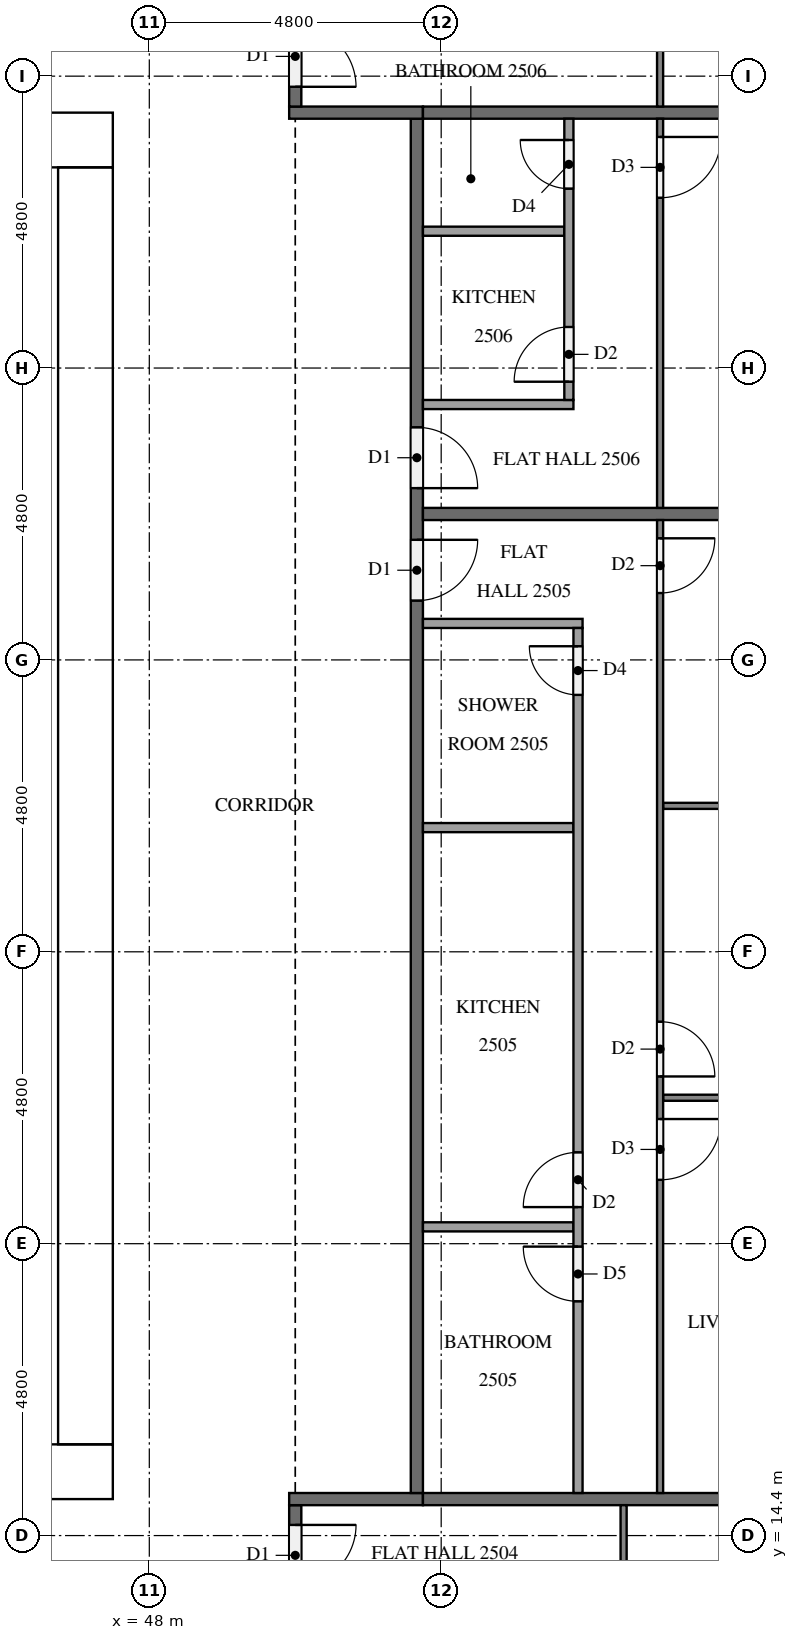
"""IFC4 building model, lengths in metres.
Left out: names, types, materials, properties, quantities, classifications, styles, units other than length and angle.
Written with IfcOpenShell. Run it as: python <this file> out.ifc"""

import sys

from ifc_helpers import new_model, si_unit, direction, frame, frame_2d, origin, place, context, subcontext, project, spatial, rectangle, extrude, element, fill, save


model = new_model("IFC4")
c1 = context("Model", 3, precision=1e-05, world=origin(), true_north=direction((0.0, 1.0)))
c2 = subcontext(c1, "Body", "Model", "MODEL_VIEW")
j1 = project(units=[si_unit("LENGTHUNIT", "METRE"), si_unit("PLANEANGLEUNIT", "RADIAN")], contexts=[c1])
p1 = place(None, origin())
s1 = spatial("IfcSite", under=j1, at=p1, CompositionType="ELEMENT")
p2 = place(p1, origin())
s2 = spatial("IfcBuilding", under=s1, at=p2, CompositionType="ELEMENT")
p3 = place(p2, frame((0.0, 0.0, 99.7)))
s3 = spatial("IfcBuildingStorey", under=s2, at=p3, CompositionType="ELEMENT", Elevation=99.7)
p4 = place(p3, frame((15.0, 15.45, 0.0), z_axis=(0.0, 0.0, 1.0), x_axis=(1.0, 0.0, 0.0)))
e1 = element("IfcWall", 1, at=p4, inside=s3, PredefinedType="SHEAR", context=c2, shape_type="SweptSolid", body=[
    extrude(rectangle(XDim=32.4, YDim=0.9, at=frame_2d((16.2, 0.0))), origin(), (0.0, 0.0, 1.0), 3.2),
])
p5 = place(p4, frame((15.3, 0.0, 0.0)))
e2 = element("IfcOpeningElement", 2, at=p5, cuts=e1, PredefinedType="OPENING", context=c2, shape_type="SweptSolid", body=[
    extrude(rectangle(XDim=1.8, YDim=2.1, at=frame_2d((0.9, 1.05))), frame((0.0, 0.46, 0.0), z_axis=(0.0, -1.0, 0.0), x_axis=(1.0, 0.0, 0.0)), (0.0, 0.0, 1.0), 0.92),
])
p6 = place(p3, frame((15.0, 37.35, 0.0), z_axis=(0.0, 0.0, 1.0), x_axis=(1.0, 0.0, 0.0)))
e3 = element("IfcWall", 3, at=p6, inside=s3, PredefinedType="SHEAR", context=c2, shape_type="SweptSolid", body=[
    extrude(rectangle(XDim=32.4, YDim=0.9, at=frame_2d((16.2, 0.0))), origin(), (0.0, 0.0, 1.0), 3.2),
])
p7 = place(p6, frame((15.3, 0.0, 0.0)))
e4 = element("IfcOpeningElement", 4, at=p7, cuts=e3, PredefinedType="OPENING", context=c2, shape_type="SweptSolid", body=[
    extrude(rectangle(XDim=1.8, YDim=2.1, at=frame_2d((0.9, 1.05))), frame((0.0, 0.46, 0.0), z_axis=(0.0, -1.0, 0.0), x_axis=(1.0, 0.0, 0.0)), (0.0, 0.0, 1.0), 0.92),
])
p8 = place(p6, frame((1.794, 0.0, 0.0)))
e5 = element("IfcOpeningElement", 5, at=p8, cuts=e3, PredefinedType="OPENING", context=c2, shape_type="SweptSolid", body=[
    extrude(rectangle(XDim=1.0, YDim=2.1, at=frame_2d((0.5, 1.05))), frame((0.0, 0.46, 0.0), z_axis=(0.0, -1.0, 0.0), x_axis=(1.0, 0.0, 0.0)), (0.0, 0.0, 1.0), 0.92),
])
p9 = place(p6, frame((5.331, 0.0, 0.0)))
e6 = element("IfcOpeningElement", 6, at=p9, cuts=e3, PredefinedType="OPENING", context=c2, shape_type="SweptSolid", body=[
    extrude(rectangle(XDim=1.0, YDim=2.1, at=frame_2d((0.5, 1.05))), frame((0.0, 0.46, 0.0), z_axis=(0.0, -1.0, 0.0), x_axis=(1.0, 0.0, 0.0)), (0.0, 0.0, 1.0), 0.92),
])
p10 = place(p3, frame((46.95, 15.9, 0.0), z_axis=(0.0, 0.0, 1.0), x_axis=(0.0, 1.0, 0.0)))
e7 = element("IfcWall", 7, at=p10, inside=s3, PredefinedType="SHEAR", context=c2, shape_type="SweptSolid", body=[
    extrude(rectangle(XDim=21.0, YDim=0.9, at=frame_2d((10.5, 0.0))), origin(), (0.0, 0.0, 1.0), 3.2),
])
p11 = place(p10, frame((10.2, 0.0, 0.0)))
e8 = element("IfcOpeningElement", 8, at=p11, cuts=e7, PredefinedType="OPENING", context=c2, shape_type="SweptSolid", body=[
    extrude(rectangle(XDim=1.2, YDim=2.1, at=frame_2d((0.6, 1.05))), frame((0.0, 0.46, 0.0), z_axis=(0.0, -1.0, 0.0), x_axis=(1.0, 0.0, 0.0)), (0.0, 0.0, 1.0), 0.92),
])
p12 = place(p3, frame((50.4, 14.9, 0.0), z_axis=(0.0, 0.0, 1.0), x_axis=(0.0, -1.0, 0.0)))
e9 = element("IfcWall", 9, at=p12, inside=s3, PredefinedType="PARTITIONING", context=c2, shape_type="SweptSolid", body=[
    extrude(rectangle(XDim=2.8, YDim=0.2, at=frame_2d((1.4, 0.0))), origin(), (0.0, 0.0, 1.0), 3.2),
])
p13 = place(p12, frame((0.325, 0.0, 0.0)))
e10 = element("IfcOpeningElement", 10, at=p13, cuts=e9, PredefinedType="OPENING", context=c2, shape_type="SweptSolid", body=[
    extrude(rectangle(XDim=1.0, YDim=2.1, at=frame_2d((0.5, 1.05))), frame((0.0, 0.11, 0.0), z_axis=(0.0, -1.0, 0.0), x_axis=(1.0, 0.0, 0.0)), (0.0, 0.0, 1.0), 0.22),
])
p14 = place(p3, frame((50.3, 15.0, 0.0), z_axis=(0.0, 0.0, 1.0), x_axis=(1.0, 0.0, 0.0)))
e11 = element("IfcWall", 11, at=p14, inside=s3, PredefinedType="PARTITIONING", context=c2, shape_type="SweptSolid", body=[
    extrude(rectangle(XDim=2.2, YDim=0.2, at=frame_2d((1.1, 0.0))), origin(), (0.0, 0.0, 1.0), 3.2),
])
p15 = place(p3, frame((52.4, 37.7, 0.0), z_axis=(0.0, 0.0, 1.0), x_axis=(0.0, -1.0, 0.0)))
e12 = element("IfcWall", 12, at=p15, inside=s3, PredefinedType="PARTITIONING", context=c2, shape_type="SweptSolid", body=[
    extrude(rectangle(XDim=22.6, YDim=0.2, at=frame_2d((11.3, 0.0))), origin(), (0.0, 0.0, 1.0), 3.2),
])
p16 = place(p15, frame((6.925, 0.0, 0.0)))
e13 = element("IfcOpeningElement", 13, at=p16, cuts=e12, PredefinedType="OPENING", context=c2, shape_type="SweptSolid", body=[
    extrude(rectangle(XDim=1.0, YDim=2.1, at=frame_2d((0.5, 1.05))), frame((0.0, 0.11, 0.0), z_axis=(0.0, -1.0, 0.0), x_axis=(1.0, 0.0, 0.0)), (0.0, 0.0, 1.0), 0.22),
])
p17 = place(p15, frame((5.075, 0.0, 0.0)))
e14 = element("IfcOpeningElement", 14, at=p17, cuts=e12, PredefinedType="OPENING", context=c2, shape_type="SweptSolid", body=[
    extrude(rectangle(XDim=1.0, YDim=2.1, at=frame_2d((0.5, 1.05))), frame((0.0, 0.11, 0.0), z_axis=(0.0, -1.0, 0.0), x_axis=(1.0, 0.0, 0.0)), (0.0, 0.0, 1.0), 0.22),
])
p18 = place(p3, frame((52.5, 37.8, 0.0), z_axis=(0.0, 0.0, 1.0), x_axis=(-1.0, 0.0, 0.0)))
e15 = element("IfcWall", 15, at=p18, inside=s3, PredefinedType="PARTITIONING", context=c2, shape_type="SweptSolid", body=[
    extrude(rectangle(XDim=2.2, YDim=0.2, at=frame_2d((1.1, 0.0))), origin(), (0.0, 0.0, 1.0), 3.2),
])
p19 = place(p3, frame((50.4, 40.7, 0.0), z_axis=(0.0, 0.0, 1.0), x_axis=(0.0, -1.0, 0.0)))
e16 = element("IfcWall", 16, at=p19, inside=s3, PredefinedType="PARTITIONING", context=c2, shape_type="SweptSolid", body=[
    extrude(rectangle(XDim=2.8, YDim=0.2, at=frame_2d((1.4, 0.0))), origin(), (0.0, 0.0, 1.0), 3.2),
])
p20 = place(p19, frame((1.475, 0.0, 0.0)))
e17 = element("IfcOpeningElement", 17, at=p20, cuts=e16, PredefinedType="OPENING", context=c2, shape_type="SweptSolid", body=[
    extrude(rectangle(XDim=1.0, YDim=2.1, at=frame_2d((0.5, 1.05))), frame((0.0, 0.11, 0.0), z_axis=(0.0, -1.0, 0.0), x_axis=(1.0, 0.0, 0.0)), (0.0, 0.0, 1.0), 0.22),
])
for number, where, z_axis, x_axis in (
    (18, (52.5, 15.0, 0.0), (0.0, 0.0, 1.0), (1.0, 0.0, 0.0)),
    (19, (52.5, 31.2, 0.0), (0.0, 0.0, 1.0), (1.0, 0.0, 0.0)),
):
    element("IfcWall", number, at=place(p3, frame(where, z_axis=z_axis, x_axis=x_axis)), inside=s3, PredefinedType="PARTITIONING", context=c2, shape_type="SweptSolid", body=[
        extrude(rectangle(XDim=9.8, YDim=0.2, at=frame_2d((4.9, 0.0))), origin(), (0.0, 0.0, 1.0), 3.2),
    ])
p21 = place(p3, frame((52.5, 37.8, 0.0), z_axis=(0.0, 0.0, 1.0), x_axis=(1.0, 0.0, 0.0)))
e20 = element("IfcWall", 20, at=p21, inside=s3, PredefinedType="PARTITIONING", context=c2, shape_type="SweptSolid", body=[
    extrude(rectangle(XDim=9.475, YDim=0.2, at=frame_2d((4.738, 0.0))), origin(), (0.0, 0.0, 1.0), 3.2),
])
p22 = place(p3, frame((55.8, 14.9, 0.0), z_axis=(0.0, 0.0, 1.0), x_axis=(0.0, -1.0, 0.0)))
e21 = element("IfcWall", 21, at=p22, inside=s3, PredefinedType="PARTITIONING", context=c2, shape_type="SweptSolid", body=[
    extrude(rectangle(XDim=10.0, YDim=0.1, at=frame_2d((5.0, 0.0))), origin(), (0.0, 0.0, 1.0), 3.2),
])
p23 = place(p22, frame((4.05, 0.0, 0.0)))
e22 = element("IfcOpeningElement", 22, at=p23, cuts=e21, PredefinedType="OPENING", context=c2, shape_type="SweptSolid", body=[
    extrude(rectangle(XDim=0.9, YDim=2.1, at=frame_2d((0.45, 1.05))), frame((0.0, 0.06, 0.0), z_axis=(0.0, -1.0, 0.0), x_axis=(1.0, 0.0, 0.0)), (0.0, 0.0, 1.0), 0.12),
])
p24 = place(p22, frame((5.65, 0.0, 0.0)))
e23 = element("IfcOpeningElement", 23, at=p24, cuts=e21, PredefinedType="OPENING", context=c2, shape_type="SweptSolid", body=[
    extrude(rectangle(XDim=1.0, YDim=2.1, at=frame_2d((0.5, 1.05))), frame((0.0, 0.06, 0.0), z_axis=(0.0, -1.0, 0.0), x_axis=(1.0, 0.0, 0.0)), (0.0, 0.0, 1.0), 0.12),
])
for number, where, z_axis, x_axis in (
    (24, (56.45, 26.4, 0.0), (0.0, 0.0, 1.0), (1.0, 0.0, 0.0)),
    (25, (56.45, 21.6, 0.0), (0.0, 0.0, 1.0), (1.0, 0.0, 0.0)),
):
    element("IfcWall", number, at=place(p3, frame(where, z_axis=z_axis, x_axis=x_axis)), inside=s3, PredefinedType="PARTITIONING", context=c2, shape_type="SweptSolid", body=[
        extrude(rectangle(XDim=5.85, YDim=0.1, at=frame_2d((2.925, 0.0))), origin(), (0.0, 0.0, 1.0), 3.2),
    ])
p25 = place(p3, frame((56.4, 31.1, 0.0), z_axis=(0.0, 0.0, 1.0), x_axis=(0.0, -1.0, 0.0)))
e26 = element("IfcWall", 26, at=p25, inside=s3, PredefinedType="PARTITIONING", context=c2, shape_type="SweptSolid", body=[
    extrude(rectangle(XDim=16.0, YDim=0.1, at=frame_2d((8.0, 0.0))), origin(), (0.0, 0.0, 1.0), 3.2),
])
p26 = place(p25, frame((0.3, 0.0, 0.0)))
e27 = element("IfcOpeningElement", 27, at=p26, cuts=e26, PredefinedType="OPENING", context=c2, shape_type="SweptSolid", body=[
    extrude(rectangle(XDim=0.9, YDim=2.1, at=frame_2d((0.45, 1.05))), frame((0.0, 0.06, 0.0), z_axis=(0.0, -1.0, 0.0), x_axis=(1.0, 0.0, 0.0)), (0.0, 0.0, 1.0), 0.12),
])
p27 = place(p25, frame((8.25, 0.0, 0.0)))
e28 = element("IfcOpeningElement", 28, at=p27, cuts=e26, PredefinedType="OPENING", context=c2, shape_type="SweptSolid", body=[
    extrude(rectangle(XDim=0.9, YDim=2.1, at=frame_2d((0.45, 1.05))), frame((0.0, 0.06, 0.0), z_axis=(0.0, -1.0, 0.0), x_axis=(1.0, 0.0, 0.0)), (0.0, 0.0, 1.0), 0.12),
])
p28 = place(p25, frame((9.85, 0.0, 0.0)))
e29 = element("IfcOpeningElement", 29, at=p28, cuts=e26, PredefinedType="OPENING", context=c2, shape_type="SweptSolid", body=[
    extrude(rectangle(XDim=1.0, YDim=2.1, at=frame_2d((0.5, 1.05))), frame((0.0, 0.06, 0.0), z_axis=(0.0, -1.0, 0.0), x_axis=(1.0, 0.0, 0.0)), (0.0, 0.0, 1.0), 0.12),
])
for number, where, z_axis, x_axis in (
    (30, (52.5, 26.042, 0.0), (0.0, 0.0, 1.0), (1.0, 0.0, 0.0)),
    (31, (52.5, 19.477, 0.0), (0.0, 0.0, 1.0), (1.0, 0.0, 0.0)),
):
    element("IfcWall", number, at=place(p3, frame(where, z_axis=z_axis, x_axis=x_axis)), inside=s3, PredefinedType="PARTITIONING", context=c2, shape_type="SweptSolid", body=[
        extrude(rectangle(XDim=2.475, YDim=0.15, at=frame_2d((1.238, 0.0))), origin(), (0.0, 0.0, 1.0), 3.2),
    ])
p29 = place(p3, frame((52.5, 29.4, 0.0), z_axis=(0.0, 0.0, 1.0), x_axis=(1.0, 0.0, 0.0)))
e32 = element("IfcWall", 32, at=p29, inside=s3, PredefinedType="PARTITIONING", context=c2, shape_type="SweptSolid", body=[
    extrude(rectangle(XDim=2.625, YDim=0.15, at=frame_2d((1.312, 0.0))), origin(), (0.0, 0.0, 1.0), 3.2),
])
p30 = place(p3, frame((55.05, 15.1, 0.0), z_axis=(0.0, 0.0, 1.0), x_axis=(0.0, 1.0, 0.0)))
e33 = element("IfcWall", 33, at=p30, inside=s3, PredefinedType="PARTITIONING", context=c2, shape_type="SweptSolid", body=[
    extrude(rectangle(XDim=14.225, YDim=0.15, at=frame_2d((7.112, 0.0))), origin(), (0.0, 0.0, 1.0), 3.2),
])
p31 = place(p30, frame((13.125, 0.0, 0.0)))
e34 = element("IfcOpeningElement", 34, at=p31, cuts=e33, PredefinedType="OPENING", context=c2, shape_type="SweptSolid", body=[
    extrude(rectangle(XDim=0.8, YDim=2.1, at=frame_2d((0.4, 1.05))), frame((0.0, 0.085, 0.0), z_axis=(0.0, -1.0, 0.0), x_axis=(1.0, 0.0, 0.0)), (0.0, 0.0, 1.0), 0.17),
])
p32 = place(p30, frame((4.702, 0.0, 0.0)))
e35 = element("IfcOpeningElement", 35, at=p32, cuts=e33, PredefinedType="OPENING", context=c2, shape_type="SweptSolid", body=[
    extrude(rectangle(XDim=0.9, YDim=2.1, at=frame_2d((0.45, 1.05))), frame((0.0, 0.085, 0.0), z_axis=(0.0, -1.0, 0.0), x_axis=(1.0, 0.0, 0.0)), (0.0, 0.0, 1.0), 0.17),
])
p33 = place(p30, frame((3.152, 0.0, 0.0)))
e36 = element("IfcOpeningElement", 36, at=p33, cuts=e33, PredefinedType="OPENING", context=c2, shape_type="SweptSolid", body=[
    extrude(rectangle(XDim=0.9, YDim=2.1, at=frame_2d((0.45, 1.05))), frame((0.0, 0.085, 0.0), z_axis=(0.0, -1.0, 0.0), x_axis=(1.0, 0.0, 0.0)), (0.0, 0.0, 1.0), 0.17),
])
p34 = place(p3, frame((56.4, 37.7, 0.0), z_axis=(0.0, 0.0, 1.0), x_axis=(0.0, -1.0, 0.0)))
e37 = element("IfcWall", 37, at=p34, inside=s3, PredefinedType="PARTITIONING", context=c2, shape_type="SweptSolid", body=[
    extrude(rectangle(XDim=6.4, YDim=0.1, at=frame_2d((3.2, 0.0))), origin(), (0.0, 0.0, 1.0), 3.2),
])
p35 = place(p34, frame((0.3, 0.0, 0.0)))
e38 = element("IfcOpeningElement", 38, at=p35, cuts=e37, PredefinedType="OPENING", context=c2, shape_type="SweptSolid", body=[
    extrude(rectangle(XDim=1.0, YDim=2.1, at=frame_2d((0.5, 1.05))), frame((0.0, 0.06, 0.0), z_axis=(0.0, -1.0, 0.0), x_axis=(1.0, 0.0, 0.0)), (0.0, 0.0, 1.0), 0.12),
])
p36 = place(p3, frame((52.5, 35.85, 0.0), z_axis=(0.0, 0.0, 1.0), x_axis=(1.0, 0.0, 0.0)))
e39 = element("IfcWall", 39, at=p36, inside=s3, PredefinedType="PARTITIONING", context=c2, shape_type="SweptSolid", body=[
    extrude(rectangle(XDim=2.325, YDim=0.15, at=frame_2d((1.163, 0.0))), origin(), (0.0, 0.0, 1.0), 3.2),
])
p37 = place(p3, frame((52.5, 33.0, 0.0), z_axis=(0.0, 0.0, 1.0), x_axis=(1.0, 0.0, 0.0)))
e40 = element("IfcWall", 40, at=p37, inside=s3, PredefinedType="PARTITIONING", context=c2, shape_type="SweptSolid", body=[
    extrude(rectangle(XDim=2.475, YDim=0.15, at=frame_2d((1.238, 0.0))), origin(), (0.0, 0.0, 1.0), 3.2),
])
p38 = place(p3, frame((54.9, 33.075, 0.0), z_axis=(0.0, 0.0, 1.0), x_axis=(0.0, 1.0, 0.0)))
e41 = element("IfcWall", 41, at=p38, inside=s3, PredefinedType="PARTITIONING", context=c2, shape_type="SweptSolid", body=[
    extrude(rectangle(XDim=4.625, YDim=0.15, at=frame_2d((2.312, 0.0))), origin(), (0.0, 0.0, 1.0), 3.2),
])
p39 = place(p38, frame((0.3, 0.0, 0.0)))
e42 = element("IfcOpeningElement", 42, at=p39, cuts=e41, PredefinedType="OPENING", context=c2, shape_type="SweptSolid", body=[
    extrude(rectangle(XDim=0.9, YDim=2.1, at=frame_2d((0.45, 1.05))), frame((0.0, 0.085, 0.0), z_axis=(0.0, -1.0, 0.0), x_axis=(1.0, 0.0, 0.0)), (0.0, 0.0, 1.0), 0.17),
])
p40 = place(p38, frame((3.475, 0.0, 0.0)))
e43 = element("IfcOpeningElement", 43, at=p40, cuts=e41, PredefinedType="OPENING", context=c2, shape_type="SweptSolid", body=[
    extrude(rectangle(XDim=0.8, YDim=2.1, at=frame_2d((0.4, 1.05))), frame((0.0, 0.085, 0.0), z_axis=(0.0, -1.0, 0.0), x_axis=(1.0, 0.0, 0.0)), (0.0, 0.0, 1.0), 0.17),
])
p41 = place(p3, frame((56.4, 52.7, 0.0), z_axis=(0.0, 0.0, 1.0), x_axis=(0.0, -1.0, 0.0)))
e44 = element("IfcWall", 44, at=p41, inside=s3, PredefinedType="PARTITIONING", context=c2, shape_type="SweptSolid", body=[
    extrude(rectangle(XDim=14.8, YDim=0.1, at=frame_2d((7.4, 0.0))), origin(), (0.0, 0.0, 1.0), 3.2),
])
p42 = place(p41, frame((9.85, 0.0, 0.0)))
e45 = element("IfcOpeningElement", 45, at=p42, cuts=e44, PredefinedType="OPENING", context=c2, shape_type="SweptSolid", body=[
    extrude(rectangle(XDim=0.9, YDim=2.1, at=frame_2d((0.45, 1.05))), frame((0.0, 0.06, 0.0), z_axis=(0.0, -1.0, 0.0), x_axis=(1.0, 0.0, 0.0)), (0.0, 0.0, 1.0), 0.12),
])
p43 = place(p41, frame((8.15, 0.0, 0.0)))
e46 = element("IfcOpeningElement", 46, at=p43, cuts=e44, PredefinedType="OPENING", context=c2, shape_type="SweptSolid", body=[
    extrude(rectangle(XDim=1.0, YDim=2.1, at=frame_2d((0.5, 1.05))), frame((0.0, 0.06, 0.0), z_axis=(0.0, -1.0, 0.0), x_axis=(1.0, 0.0, 0.0)), (0.0, 0.0, 1.0), 0.12),
])
p44 = place(p41, frame((0.5, 0.0, 0.0)))
e47 = element("IfcOpeningElement", 47, at=p44, cuts=e44, PredefinedType="OPENING", context=c2, shape_type="SweptSolid", body=[
    extrude(rectangle(XDim=0.9, YDim=2.1, at=frame_2d((0.45, 1.05))), frame((0.0, 0.06, 0.0), z_axis=(0.0, -1.0, 0.0), x_axis=(1.0, 0.0, 0.0)), (0.0, 0.0, 1.0), 0.12),
])
p45 = place(p11, origin())
e48 = element("IfcDoor", 48, at=p45, inside=s3, OperationType="SINGLE_SWING_LEFT", PredefinedType="DOOR", context=c2, shape_type="SweptSolid", body=[
    extrude(rectangle(XDim=1.2, YDim=2.1, at=frame_2d((0.6, 1.05))), frame((0.0, 0.025, 0.0), z_axis=(0.0, -1.0, 0.0), x_axis=(1.0, 0.0, 0.0)), (0.0, 0.0, 1.0), 0.05),
])
fill(e8, e48)
p46 = place(p13, origin())
e49 = element("IfcDoor", 49, at=p46, inside=s3, OperationType="SINGLE_SWING_LEFT", PredefinedType="DOOR", context=c2, shape_type="SweptSolid", body=[
    extrude(rectangle(XDim=1.0, YDim=2.1, at=frame_2d((0.5, 1.05))), frame((0.0, 0.025, 0.0), z_axis=(0.0, -1.0, 0.0), x_axis=(1.0, 0.0, 0.0)), (0.0, 0.0, 1.0), 0.05),
])
fill(e10, e49)
p47 = place(p16, origin())
e50 = element("IfcDoor", 50, at=p47, inside=s3, OperationType="SINGLE_SWING_LEFT", PredefinedType="DOOR", context=c2, shape_type="SweptSolid", body=[
    extrude(rectangle(XDim=1.0, YDim=2.1, at=frame_2d((0.5, 1.05))), frame((0.0, 0.025, 0.0), z_axis=(0.0, -1.0, 0.0), x_axis=(1.0, 0.0, 0.0)), (0.0, 0.0, 1.0), 0.05),
])
fill(e13, e50)
p48 = place(p17, origin())
e51 = element("IfcDoor", 51, at=p48, inside=s3, OperationType="SINGLE_SWING_RIGHT", PredefinedType="DOOR", context=c2, shape_type="SweptSolid", body=[
    extrude(rectangle(XDim=1.0, YDim=2.1, at=frame_2d((0.5, 1.05))), frame((0.0, 0.025, 0.0), z_axis=(0.0, -1.0, 0.0), x_axis=(1.0, 0.0, 0.0)), (0.0, 0.0, 1.0), 0.05),
])
fill(e14, e51)
p49 = place(p20, origin())
e52 = element("IfcDoor", 52, at=p49, inside=s3, OperationType="SINGLE_SWING_RIGHT", PredefinedType="DOOR", context=c2, shape_type="SweptSolid", body=[
    extrude(rectangle(XDim=1.0, YDim=2.1, at=frame_2d((0.5, 1.05))), frame((0.0, 0.025, 0.0), z_axis=(0.0, -1.0, 0.0), x_axis=(1.0, 0.0, 0.0)), (0.0, 0.0, 1.0), 0.05),
])
fill(e17, e52)
p50 = place(p26, origin())
e53 = element("IfcDoor", 53, at=p50, inside=s3, OperationType="SINGLE_SWING_LEFT", PredefinedType="DOOR", context=c2, shape_type="SweptSolid", body=[
    extrude(rectangle(XDim=0.9, YDim=2.1, at=frame_2d((0.45, 1.05))), frame((0.0, 0.025, 0.0), z_axis=(0.0, -1.0, 0.0), x_axis=(1.0, 0.0, 0.0)), (0.0, 0.0, 1.0), 0.05),
])
fill(e27, e53)
p51 = place(p27, origin())
e54 = element("IfcDoor", 54, at=p51, inside=s3, OperationType="SINGLE_SWING_RIGHT", PredefinedType="DOOR", context=c2, shape_type="SweptSolid", body=[
    extrude(rectangle(XDim=0.9, YDim=2.1, at=frame_2d((0.45, 1.05))), frame((0.0, 0.025, 0.0), z_axis=(0.0, -1.0, 0.0), x_axis=(1.0, 0.0, 0.0)), (0.0, 0.0, 1.0), 0.05),
])
fill(e28, e54)
p52 = place(p28, origin())
e55 = element("IfcDoor", 55, at=p52, inside=s3, OperationType="SINGLE_SWING_LEFT", PredefinedType="DOOR", context=c2, shape_type="SweptSolid", body=[
    extrude(rectangle(XDim=1.0, YDim=2.1, at=frame_2d((0.5, 1.05))), frame((0.0, 0.025, 0.0), z_axis=(0.0, -1.0, 0.0), x_axis=(1.0, 0.0, 0.0)), (0.0, 0.0, 1.0), 0.05),
])
fill(e29, e55)
p53 = place(p31, origin())
e56 = element("IfcDoor", 56, at=p53, inside=s3, OperationType="SINGLE_SWING_RIGHT", PredefinedType="DOOR", context=c2, shape_type="SweptSolid", body=[
    extrude(rectangle(XDim=0.8, YDim=2.1, at=frame_2d((0.4, 1.05))), frame((0.0, 0.025, 0.0), z_axis=(0.0, -1.0, 0.0), x_axis=(1.0, 0.0, 0.0)), (0.0, 0.0, 1.0), 0.05),
])
fill(e34, e56)
p54 = place(p32, origin())
e57 = element("IfcDoor", 57, at=p54, inside=s3, OperationType="SINGLE_SWING_LEFT", PredefinedType="DOOR", context=c2, shape_type="SweptSolid", body=[
    extrude(rectangle(XDim=0.9, YDim=2.1, at=frame_2d((0.45, 1.05))), frame((0.0, 0.025, 0.0), z_axis=(0.0, -1.0, 0.0), x_axis=(1.0, 0.0, 0.0)), (0.0, 0.0, 1.0), 0.05),
])
fill(e35, e57)
p55 = place(p33, origin())
e58 = element("IfcDoor", 58, at=p55, inside=s3, OperationType="SINGLE_SWING_RIGHT", PredefinedType="DOOR", context=c2, shape_type="SweptSolid", body=[
    extrude(rectangle(XDim=0.9, YDim=2.1, at=frame_2d((0.45, 1.05))), frame((0.0, 0.025, 0.0), z_axis=(0.0, -1.0, 0.0), x_axis=(1.0, 0.0, 0.0)), (0.0, 0.0, 1.0), 0.05),
])
fill(e36, e58)
p56 = place(p35, origin())
e59 = element("IfcDoor", 59, at=p56, inside=s3, OperationType="SINGLE_SWING_LEFT", PredefinedType="DOOR", context=c2, shape_type="SweptSolid", body=[
    extrude(rectangle(XDim=1.0, YDim=2.1, at=frame_2d((0.5, 1.05))), frame((0.0, 0.025, 0.0), z_axis=(0.0, -1.0, 0.0), x_axis=(1.0, 0.0, 0.0)), (0.0, 0.0, 1.0), 0.05),
])
fill(e38, e59)
p57 = place(p39, origin())
e60 = element("IfcDoor", 60, at=p57, inside=s3, OperationType="SINGLE_SWING_LEFT", PredefinedType="DOOR", context=c2, shape_type="SweptSolid", body=[
    extrude(rectangle(XDim=0.9, YDim=2.1, at=frame_2d((0.45, 1.05))), frame((0.0, 0.025, 0.0), z_axis=(0.0, -1.0, 0.0), x_axis=(1.0, 0.0, 0.0)), (0.0, 0.0, 1.0), 0.05),
])
fill(e42, e60)
p58 = place(p40, origin())
e61 = element("IfcDoor", 61, at=p58, inside=s3, OperationType="SINGLE_SWING_RIGHT", PredefinedType="DOOR", context=c2, shape_type="SweptSolid", body=[
    extrude(rectangle(XDim=0.8, YDim=2.1, at=frame_2d((0.4, 1.05))), frame((0.0, 0.025, 0.0), z_axis=(0.0, -1.0, 0.0), x_axis=(1.0, 0.0, 0.0)), (0.0, 0.0, 1.0), 0.05),
])
fill(e43, e61)
save(model, sys.argv[1])
